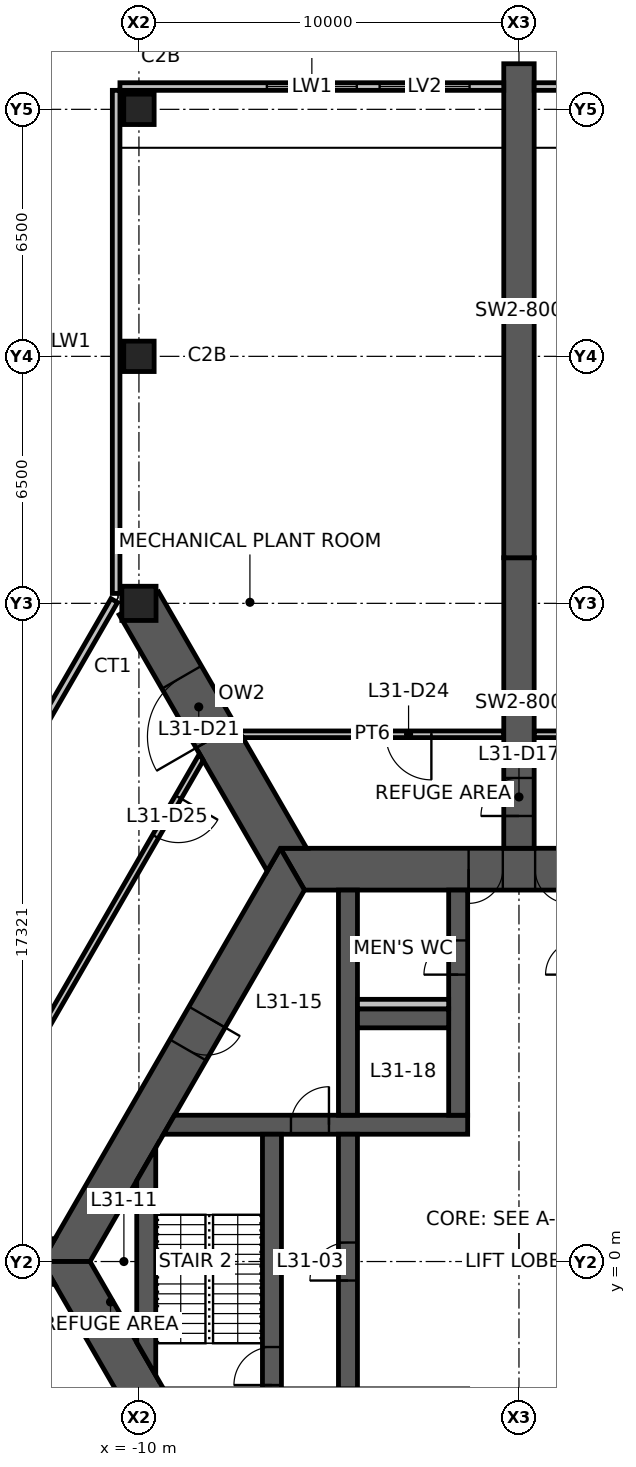
"""IFC4 building model, lengths in metres.
Left out: names, types, materials, properties, quantities, classifications, styles, units other than length and angle.
Written with IfcOpenShell. Run it as: python <this file> out.ifc"""

import sys

from ifc_helpers import new_model, si_unit, direction, frame, frame_2d, origin, origin_2d, place, context, subcontext, project, spatial, polyline, rectangle, hollow_rectangle, outline, extrude, element, fill, save


model = new_model("IFC4")
c1 = context("Model", 3, precision=1e-05, world=origin(), true_north=direction((0.0, 1.0)))
c2 = subcontext(c1, "Body", "Model", "MODEL_VIEW")
j1 = project(units=[si_unit("LENGTHUNIT", "METRE"), si_unit("PLANEANGLEUNIT", "RADIAN")], contexts=[c1])
p1 = place(None, origin())
s1 = spatial("IfcSite", under=j1, at=p1, CompositionType="ELEMENT")
p2 = place(p1, origin())
s2 = spatial("IfcBuilding", under=s1, at=p2, CompositionType="ELEMENT")
p3 = place(p2, frame((0.0, 0.0, 123.6)))
s3 = spatial("IfcBuildingStorey", under=s2, at=p3, CompositionType="ELEMENT", Elevation=123.6)
p4 = place(p3, frame((-10.0, 17.321, 0.0), z_axis=(0.0, 0.0, 1.0), x_axis=(1.0, 0.0, 0.0)))
e1 = element("IfcColumn", 1, at=p4, inside=s3, PredefinedType="COLUMN", context=c2, shape_type="SweptSolid", body=[
    extrude(hollow_rectangle(XDim=0.9, YDim=0.9, WallThickness=0.07, at=origin_2d()), origin(), (0.0, 0.0, 1.0), 5.0),
])
for number, where, z_axis, x_axis in (
    (2, (-10.0, 23.821, 0.0), (0.0, 0.0, 1.0), (1.0, 0.0, 0.0)),
    (3, (-10.0, 30.321, 0.0), (0.0, 0.0, 1.0), (1.0, 0.0, 0.0)),
):
    element("IfcColumn", number, at=place(p3, frame(where, z_axis=z_axis, x_axis=x_axis)), inside=s3, PredefinedType="COLUMN", context=c2, shape_type="SweptSolid", body=[
        extrude(hollow_rectangle(XDim=0.8, YDim=0.8, WallThickness=0.045, at=origin_2d()), origin(), (0.0, 0.0, 1.0), 5.0),
    ])
p5 = place(p3, frame((5.961, 10.325, 0.0), z_axis=(0.0, 0.0, 1.0), x_axis=(-1.0, 0.0, 0.0)))
e4 = element("IfcWall", 4, at=p5, inside=s3, PredefinedType="SHEAR", context=c2, shape_type="SweptSolid", body=[
    extrude(outline(polyline([(-0.318, -0.55), (4.636, -0.55), (5.536, -0.55), (6.386, -0.55), (7.286, -0.55), (12.24, -0.55), (11.605, 0.55), (7.286, 0.55), (6.386, 0.55), (5.536, 0.55), (4.636, 0.55), (0.318, 0.55), (-0.318, -0.55)])), origin(), (0.0, 0.0, 1.0), 5.0),
])
p6 = place(p5, frame((6.386, 0.0, 0.0)))
e5 = element("IfcOpeningElement", 5, at=p6, cuts=e4, PredefinedType="OPENING", context=c2, shape_type="SweptSolid", body=[
    extrude(rectangle(XDim=0.9, YDim=2.1, at=frame_2d((0.45, 1.05))), frame((0.0, 0.56, 0.0), z_axis=(0.0, -1.0, 0.0), x_axis=(1.0, 0.0, 0.0)), (0.0, 0.0, 1.0), 1.12),
])
p7 = place(p5, frame((4.636, 0.0, 0.0)))
e6 = element("IfcOpeningElement", 6, at=p7, cuts=e4, PredefinedType="OPENING", context=c2, shape_type="SweptSolid", body=[
    extrude(rectangle(XDim=0.9, YDim=2.1, at=frame_2d((0.45, 1.05))), frame((0.0, 0.56, 0.0), z_axis=(0.0, -1.0, 0.0), x_axis=(1.0, 0.0, 0.0)), (0.0, 0.0, 1.0), 1.12),
])
p8 = place(p3, frame((-5.961, 10.325, 0.0), z_axis=(0.0, 0.0, 1.0), x_axis=(-0.500004296715, -0.866022923061, 0.0)))
e7 = element("IfcWall", 7, at=p8, inside=s3, PredefinedType="SHEAR", context=c2, shape_type="SweptSolid", body=[
    extrude(outline(polyline([(-0.318, -0.55), (4.494, -0.55), (5.494, -0.55), (12.24, -0.55), (11.605, 0.55), (5.494, 0.55), (4.494, 0.55), (0.318, 0.55), (-0.318, -0.55)])), origin(), (0.0, 0.0, 1.0), 5.0),
])
p9 = place(p8, frame((4.494, 0.0, 0.0)))
e8 = element("IfcOpeningElement", 8, at=p9, cuts=e7, PredefinedType="OPENING", context=c2, shape_type="SweptSolid", body=[
    extrude(rectangle(XDim=1.0, YDim=2.1, at=frame_2d((0.5, 1.05))), frame((0.0, 0.56, 0.0), z_axis=(0.0, -1.0, 0.0), x_axis=(1.0, 0.0, 0.0)), (0.0, 0.0, 1.0), 1.12),
])
p10 = place(p3, frame((-11.922, 0.0, 0.0), z_axis=(0.0, 0.0, 1.0), x_axis=(0.500004296715, -0.866022923061, 0.0)))
e9 = element("IfcWall", 9, at=p10, inside=s3, PredefinedType="SHEAR", context=c2, shape_type="SweptSolid", body=[
    extrude(outline(polyline([(-0.318, -0.55), (6.381, -0.55), (7.181, -0.55), (12.24, -0.55), (11.605, 0.55), (7.181, 0.55), (6.381, 0.55), (0.318, 0.55), (-0.318, -0.55)])), origin(), (0.0, 0.0, 1.0), 5.0),
])
p11 = place(p10, frame((6.381, 0.0, 0.0)))
e10 = element("IfcOpeningElement", 10, at=p11, cuts=e9, PredefinedType="OPENING", context=c2, shape_type="SweptSolid", body=[
    extrude(rectangle(XDim=0.8, YDim=2.1, at=frame_2d((0.4, 1.05))), frame((0.0, 0.56, 0.0), z_axis=(0.0, -1.0, 0.0), x_axis=(1.0, 0.0, 0.0)), (0.0, 0.0, 1.0), 1.12),
])
p12 = place(p3, frame((0.0, 10.875, 0.0), z_axis=(0.0, 0.0, 1.0), x_axis=(0.0, 1.0, 0.0)))
e11 = element("IfcWall", 11, at=p12, inside=s3, PredefinedType="SHEAR", context=c2, shape_type="SweptSolid", body=[
    extrude(rectangle(XDim=7.646, YDim=0.8, at=frame_2d((3.823, 0.0))), origin(), (0.0, 0.0, 1.0), 5.0),
])
p13 = place(p12, frame((0.85, 0.0, 0.0)))
e12 = element("IfcOpeningElement", 12, at=p13, cuts=e11, PredefinedType="OPENING", context=c2, shape_type="SweptSolid", body=[
    extrude(rectangle(XDim=1.0, YDim=2.1, at=frame_2d((0.5, 1.05))), frame((0.0, 0.41, 0.0), z_axis=(0.0, -1.0, 0.0), x_axis=(1.0, 0.0, 0.0)), (0.0, 0.0, 1.0), 0.82),
])
p14 = place(p3, frame((0.0, 18.521, 0.0), z_axis=(0.0, 0.0, 1.0), x_axis=(0.0, 1.0, 0.0)))
e13 = element("IfcWall", 13, at=p14, inside=s3, PredefinedType="SHEAR", context=c2, shape_type="SweptSolid", body=[
    extrude(rectangle(XDim=13.0, YDim=0.8, at=frame_2d((6.5, 0.0))), origin(), (0.0, 0.0, 1.0), 5.0),
])
p15 = place(p3, frame((-6.279, 10.875, -1.15), z_axis=(0.0, 0.0, 1.0), x_axis=(-0.50000923905, 0.866020069551, 0.0)))
e14 = element("IfcWall", 14, at=p15, inside=s3, PredefinedType="SHEAR", context=c2, shape_type="SweptSolid", body=[
    extrude(outline(polyline([(-0.346, -0.6), (3.395, -0.6), (5.195, -0.6), (7.443, -0.6), (7.443, 0.6), (5.195, 0.6), (3.395, 0.6), (-0.346, 0.6), (0.0, 0.0), (-0.346, -0.6)])), origin(), (0.0, 0.0, 1.0), 6.15),
])
p16 = place(p15, frame((3.395, 0.0, 1.15)))
e15 = element("IfcOpeningElement", 15, at=p16, cuts=e14, PredefinedType="OPENING", context=c2, shape_type="SweptSolid", body=[
    extrude(rectangle(XDim=1.8, YDim=2.4, at=frame_2d((0.9, 1.2))), frame((0.0, 0.61, 0.0), z_axis=(0.0, -1.0, 0.0), x_axis=(1.0, 0.0, 0.0)), (0.0, 0.0, 1.0), 1.22),
])
p17 = place(p3, frame((-12.557, 0.0, -1.15), z_axis=(0.0, 0.0, 1.0), x_axis=(-1.0, 0.0, 0.0)))
e16 = element("IfcWall", 16, at=p17, inside=s3, PredefinedType="SHEAR", context=c2, shape_type="SweptSolid", body=[
    extrude(outline(polyline([(-0.346, -0.6), (7.443, -0.6), (7.443, 0.6), (-0.346, 0.6), (0.0, 0.0), (-0.346, -0.6)])), origin(), (0.0, 0.0, 1.0), 6.15),
])
p18 = place(p3, frame((10.5, 30.92, 0.0), z_axis=(0.0, 0.0, 1.0), x_axis=(-1.0, 0.0, 0.0)))
e17 = element("IfcWall", 17, at=p18, inside=s3, PredefinedType="ELEMENTEDWALL", context=c2, shape_type="SweptSolid", body=[
    extrude(rectangle(XDim=10.1, YDim=0.2, at=frame_2d((5.05, 0.0))), origin(), (0.0, 0.0, 1.0), 5.0),
])
p19 = place(p18, frame((3.867, 0.0, 0.6)))
e18 = element("IfcOpeningElement", 18, at=p19, cuts=e17, PredefinedType="OPENING", context=c2, shape_type="SweptSolid", body=[
    extrude(rectangle(XDim=2.367, YDim=3.6, at=frame_2d((1.183, 1.8))), frame((0.0, 0.11, 0.0), z_axis=(0.0, -1.0, 0.0), x_axis=(1.0, 0.0, 0.0)), (0.0, 0.0, 1.0), 0.22),
])
p20 = place(p18, frame((6.833, 0.0, 0.6)))
e19 = element("IfcOpeningElement", 19, at=p20, cuts=e17, PredefinedType="OPENING", context=c2, shape_type="SweptSolid", body=[
    extrude(rectangle(XDim=2.367, YDim=3.6, at=frame_2d((1.183, 1.8))), frame((0.0, 0.11, 0.0), z_axis=(0.0, -1.0, 0.0), x_axis=(1.0, 0.0, 0.0)), (0.0, 0.0, 1.0), 0.22),
])
p21 = place(p3, frame((-0.4, 30.92, 0.0), z_axis=(0.0, 0.0, 1.0), x_axis=(-1.0, 0.0, 0.0)))
e20 = element("IfcWall", 20, at=p21, inside=s3, PredefinedType="ELEMENTEDWALL", context=c2, shape_type="SweptSolid", body=[
    extrude(rectangle(XDim=10.1, YDim=0.2, at=frame_2d((5.05, 0.0))), origin(), (0.0, 0.0, 1.0), 5.0),
])
p22 = place(p21, frame((0.9, 0.0, 0.6)))
e21 = element("IfcOpeningElement", 21, at=p22, cuts=e20, PredefinedType="OPENING", context=c2, shape_type="SweptSolid", body=[
    extrude(rectangle(XDim=2.367, YDim=3.6, at=frame_2d((1.183, 1.8))), frame((0.0, 0.11, 0.0), z_axis=(0.0, -1.0, 0.0), x_axis=(1.0, 0.0, 0.0)), (0.0, 0.0, 1.0), 0.22),
])
p23 = place(p21, frame((3.867, 0.0, 0.6)))
e22 = element("IfcOpeningElement", 22, at=p23, cuts=e20, PredefinedType="OPENING", context=c2, shape_type="SweptSolid", body=[
    extrude(rectangle(XDim=2.367, YDim=3.6, at=frame_2d((1.183, 1.8))), frame((0.0, 0.11, 0.0), z_axis=(0.0, -1.0, 0.0), x_axis=(1.0, 0.0, 0.0)), (0.0, 0.0, 1.0), 0.22),
])
p24 = place(p3, frame((-10.6, 30.821, 0.0), z_axis=(0.0, 0.0, 1.0), x_axis=(0.0, -1.0, 0.0)))
e23 = element("IfcWall", 23, at=p24, inside=s3, PredefinedType="ELEMENTEDWALL", context=c2, shape_type="SweptSolid", body=[
    extrude(rectangle(XDim=13.239, YDim=0.2, at=frame_2d((6.62, 0.0))), origin(), (0.0, 0.0, 1.0), 5.0),
])
p25 = place(p3, frame((-10.65, 17.395, 0.0), z_axis=(0.0, 0.0, 1.0), x_axis=(-0.499999841607, -0.866025495233, 0.0)))
e24 = element("IfcWall", 24, at=p25, inside=s3, PredefinedType="ELEMENTEDWALL", context=c2, shape_type="SweptSolid", body=[
    extrude(rectangle(XDim=19.479, YDim=0.2, at=frame_2d((9.739, 0.0))), origin(), (0.0, 0.0, 1.0), 5.0),
])
p26 = place(p3, frame((-9.209, 3.6, 0.0), z_axis=(0.0, 0.0, 1.0), x_axis=(1.0, 0.0, 0.0)))
e25 = element("IfcWall", 25, at=p26, inside=s3, PredefinedType="SHEAR", context=c2, shape_type="SweptSolid", body=[
    extrude(outline(polyline([(-0.144, -0.25), (3.209, -0.25), (4.209, -0.25), (7.859, -0.25), (7.859, 0.25), (4.209, 0.25), (3.209, 0.25), (0.144, 0.25), (-0.144, -0.25)])), origin(), (0.0, 0.0, 1.0), 5.0),
])
p27 = place(p26, frame((3.209, 0.0, 0.0)))
e26 = element("IfcOpeningElement", 26, at=p27, cuts=e25, PredefinedType="OPENING", context=c2, shape_type="SweptSolid", body=[
    extrude(rectangle(XDim=1.0, YDim=2.1, at=frame_2d((0.5, 1.05))), frame((0.0, 0.26, 0.0), z_axis=(0.0, -1.0, 0.0), x_axis=(1.0, 0.0, 0.0)), (0.0, 0.0, 1.0), 0.52),
])
p28 = place(p3, frame((-1.6, 3.85, 0.0), z_axis=(0.0, 0.0, 1.0), x_axis=(0.0, 1.0, 0.0)))
e27 = element("IfcWall", 27, at=p28, inside=s3, PredefinedType="SHEAR", context=c2, shape_type="SweptSolid", body=[
    extrude(rectangle(XDim=5.925, YDim=0.5, at=frame_2d((2.962, 0.0))), origin(), (0.0, 0.0, 1.0), 5.0),
])
p29 = place(p28, frame((3.7, 0.0, 0.0)))
e28 = element("IfcOpeningElement", 28, at=p29, cuts=e27, PredefinedType="OPENING", context=c2, shape_type="SweptSolid", body=[
    extrude(rectangle(XDim=0.9, YDim=2.1, at=frame_2d((0.45, 1.05))), frame((0.0, 0.26, 0.0), z_axis=(0.0, -1.0, 0.0), x_axis=(1.0, 0.0, 0.0)), (0.0, 0.0, 1.0), 0.52),
])
p30 = place(p3, frame((-4.5, -3.35, 0.0), z_axis=(0.0, 0.0, 1.0), x_axis=(0.0, 1.0, 0.0)))
e29 = element("IfcWall", 29, at=p30, inside=s3, PredefinedType="SHEAR", context=c2, shape_type="SweptSolid", body=[
    extrude(rectangle(XDim=6.7, YDim=0.5, at=frame_2d((3.35, 0.0))), origin(), (0.0, 0.0, 1.0), 5.0),
])
p31 = place(p30, frame((2.85, 0.0, 0.0)))
e30 = element("IfcOpeningElement", 30, at=p31, cuts=e29, PredefinedType="OPENING", context=c2, shape_type="SweptSolid", body=[
    extrude(rectangle(XDim=1.0, YDim=2.1, at=frame_2d((0.5, 1.05))), frame((0.0, 0.26, 0.0), z_axis=(0.0, -1.0, 0.0), x_axis=(1.0, 0.0, 0.0)), (0.0, 0.0, 1.0), 0.52),
])
p32 = place(p3, frame((-6.5, -3.35, 0.0), z_axis=(0.0, 0.0, 1.0), x_axis=(0.0, 1.0, 0.0)))
e31 = element("IfcWall", 31, at=p32, inside=s3, PredefinedType="SHEAR", context=c2, shape_type="SweptSolid", body=[
    extrude(rectangle(XDim=6.7, YDim=0.5, at=frame_2d((3.35, 0.0))), origin(), (0.0, 0.0, 1.0), 5.0),
])
p33 = place(p32, frame((0.1, 0.0, 0.0)))
e32 = element("IfcOpeningElement", 32, at=p33, cuts=e31, PredefinedType="OPENING", context=c2, shape_type="SweptSolid", body=[
    extrude(rectangle(XDim=1.0, YDim=2.1, at=frame_2d((0.5, 1.05))), frame((0.0, 0.26, 0.0), z_axis=(0.0, -1.0, 0.0), x_axis=(1.0, 0.0, 0.0)), (0.0, 0.0, 1.0), 0.52),
])
p34 = place(p3, frame((-4.5, 3.85, 0.0), z_axis=(0.0, 0.0, 1.0), x_axis=(0.0, 1.0, 0.0)))
e33 = element("IfcWall", 33, at=p34, inside=s3, PredefinedType="SHEAR", context=c2, shape_type="SweptSolid", body=[
    extrude(rectangle(XDim=5.925, YDim=0.5, at=frame_2d((2.962, 0.0))), origin(), (0.0, 0.0, 1.0), 5.0),
])
p35 = place(p3, frame((-4.25, 6.4, 0.0), z_axis=(0.0, 0.0, 1.0), x_axis=(1.0, 0.0, 0.0)))
e34 = element("IfcWall", 34, at=p35, inside=s3, PredefinedType="SHEAR", context=c2, shape_type="SweptSolid", body=[
    extrude(rectangle(XDim=2.4, YDim=0.5, at=frame_2d((1.2, 0.0))), origin(), (0.0, 0.0, 1.0), 5.0),
])
p36 = place(p3, frame((-9.808, -2.562, 0.0), z_axis=(0.0, 0.0, 1.0), x_axis=(0.0, 1.0, 0.0)))
e35 = element("IfcWall", 35, at=p36, inside=s3, PredefinedType="SHEAR", context=c2, shape_type="SweptSolid", body=[
    extrude(outline(polyline([(-0.433, -0.25), (5.558, -0.25), (4.691, 0.25), (0.433, 0.25), (-0.433, -0.25)])), origin(), (0.0, 0.0, 1.0), 5.0),
])
p37 = place(p3, frame((-4.25, 6.775, 0.0), z_axis=(0.0, 0.0, 1.0), x_axis=(1.0, 0.0, 0.0)))
e36 = element("IfcWall", 36, at=p37, inside=s3, PredefinedType="PLUMBINGWALL", context=c2, shape_type="SweptSolid", body=[
    extrude(rectangle(XDim=2.4, YDim=0.25, at=frame_2d((1.2, 0.0))), origin(), (0.0, 0.0, 1.0), 5.0),
])
p38 = place(p3, frame((7.318, 13.875, 0.0), z_axis=(0.0, 0.0, 1.0), x_axis=(-1.0, 0.0, 0.0)))
e37 = element("IfcWall", 37, at=p38, inside=s3, PredefinedType="PARTITIONING", context=c2, shape_type="SweptSolid", body=[
    extrude(outline(polyline([(-0.051, -0.087), (6.913, -0.087), (6.913, 0.087), (0.051, 0.087), (-0.051, -0.087)])), origin(), (0.0, 0.0, 1.0), 4.8),
])
p39 = place(p3, frame((-0.405, 13.875, 0.0), z_axis=(0.0, 0.0, 1.0), x_axis=(-1.0, 0.0, 0.0)))
e38 = element("IfcWall", 38, at=p39, inside=s3, PredefinedType="PARTITIONING", context=c2, shape_type="SweptSolid", body=[
    extrude(outline(polyline([(0.0, -0.087), (1.9, -0.087), (3.1, -0.087), (6.963, -0.087), (6.862, 0.087), (3.1, 0.087), (1.9, 0.087), (0.0, 0.087), (0.0, -0.087)])), origin(), (0.0, 0.0, 1.0), 4.8),
])
p40 = place(p39, frame((1.9, 0.0, 0.0)))
e39 = element("IfcOpeningElement", 39, at=p40, cuts=e38, PredefinedType="OPENING", context=c2, shape_type="SweptSolid", body=[
    extrude(rectangle(XDim=1.2, YDim=2.1, at=frame_2d((0.6, 1.05))), frame((0.0, 0.098, 0.0), z_axis=(0.0, -1.0, 0.0), x_axis=(1.0, 0.0, 0.0)), (0.0, 0.0, 1.0), 0.195),
])
p41 = place(p3, frame((-8.357, 13.275, 0.0), z_axis=(0.0, 0.0, 1.0), x_axis=(-0.500003545903, -0.866023356546, 0.0)))
e40 = element("IfcWall", 40, at=p41, inside=s3, PredefinedType="PARTITIONING", context=c2, shape_type="SweptSolid", body=[
    extrude(outline(polyline([(-0.051, -0.087), (1.213, -0.087), (2.413, -0.087), (14.686, -0.087), (14.585, 0.087), (2.413, 0.087), (1.213, 0.087), (0.051, 0.087), (-0.051, -0.087)])), origin(), (0.0, 0.0, 1.0), 4.8),
])
p42 = place(p41, frame((1.213, 0.0, 0.0)))
e41 = element("IfcOpeningElement", 41, at=p42, cuts=e40, PredefinedType="OPENING", context=c2, shape_type="SweptSolid", body=[
    extrude(rectangle(XDim=1.2, YDim=2.1, at=frame_2d((0.6, 1.05))), frame((0.0, 0.098, 0.0), z_axis=(0.0, -1.0, 0.0), x_axis=(1.0, 0.0, 0.0)), (0.0, 0.0, 1.0), 0.195),
])
p43 = place(p3, frame((-15.675, -0.6, 0.0), z_axis=(0.0, 0.0, 1.0), x_axis=(0.500005739714, -0.866022089933, 0.0)))
e42 = element("IfcWall", 42, at=p43, inside=s3, PredefinedType="PARTITIONING", context=c2, shape_type="SweptSolid", body=[
    extrude(outline(polyline([(-0.051, -0.087), (6.913, -0.087), (6.913, 0.087), (0.051, 0.087), (-0.051, -0.087)])), origin(), (0.0, 0.0, 1.0), 4.8),
])
p44 = place(p22, origin())
e43 = element("IfcWindow", 43, at=p44, inside=s3, PartitioningType="SINGLE_PANEL", PredefinedType="USERDEFINED", context=c2, shape_type="SweptSolid", body=[
    extrude(rectangle(XDim=2.367, YDim=3.6, at=frame_2d((1.183, 1.8))), frame((0.0, 0.03, 0.0), z_axis=(0.0, -1.0, 0.0), x_axis=(1.0, 0.0, 0.0)), (0.0, 0.0, 1.0), 0.06),
])
fill(e21, e43)
p45 = place(p23, origin())
e44 = element("IfcWindow", 44, at=p45, inside=s3, PartitioningType="SINGLE_PANEL", PredefinedType="USERDEFINED", context=c2, shape_type="SweptSolid", body=[
    extrude(rectangle(XDim=2.367, YDim=3.6, at=frame_2d((1.183, 1.8))), frame((0.0, 0.03, 0.0), z_axis=(0.0, -1.0, 0.0), x_axis=(1.0, 0.0, 0.0)), (0.0, 0.0, 1.0), 0.06),
])
fill(e22, e44)
p46 = place(p6, origin())
e45 = element("IfcDoor", 45, at=p46, inside=s3, OperationType="SINGLE_SWING_RIGHT", PredefinedType="DOOR", context=c2, shape_type="SweptSolid", body=[
    extrude(rectangle(XDim=0.9, YDim=2.1, at=frame_2d((0.45, 1.05))), frame((0.0, 0.025, 0.0), z_axis=(0.0, -1.0, 0.0), x_axis=(1.0, 0.0, 0.0)), (0.0, 0.0, 1.0), 0.05),
])
fill(e5, e45)
p47 = place(p7, origin())
e46 = element("IfcDoor", 46, at=p47, inside=s3, OperationType="SINGLE_SWING_LEFT", PredefinedType="DOOR", context=c2, shape_type="SweptSolid", body=[
    extrude(rectangle(XDim=0.9, YDim=2.1, at=frame_2d((0.45, 1.05))), frame((0.0, 0.025, 0.0), z_axis=(0.0, -1.0, 0.0), x_axis=(1.0, 0.0, 0.0)), (0.0, 0.0, 1.0), 0.05),
])
fill(e6, e46)
p48 = place(p9, origin())
e47 = element("IfcDoor", 47, at=p48, inside=s3, OperationType="SINGLE_SWING_LEFT", PredefinedType="DOOR", context=c2, shape_type="SweptSolid", body=[
    extrude(rectangle(XDim=1.0, YDim=2.1, at=frame_2d((0.5, 1.05))), frame((0.0, 0.025, 0.0), z_axis=(0.0, -1.0, 0.0), x_axis=(1.0, 0.0, 0.0)), (0.0, 0.0, 1.0), 0.05),
])
fill(e8, e47)
p49 = place(p31, origin())
e48 = element("IfcDoor", 48, at=p49, inside=s3, OperationType="SINGLE_SWING_LEFT", PredefinedType="DOOR", context=c2, shape_type="SweptSolid", body=[
    extrude(rectangle(XDim=1.0, YDim=2.1, at=frame_2d((0.5, 1.05))), frame((0.0, 0.025, 0.0), z_axis=(0.0, -1.0, 0.0), x_axis=(1.0, 0.0, 0.0)), (0.0, 0.0, 1.0), 0.05),
])
fill(e30, e48)
p50 = place(p33, origin())
e49 = element("IfcDoor", 49, at=p50, inside=s3, OperationType="SINGLE_SWING_LEFT", PredefinedType="DOOR", context=c2, shape_type="SweptSolid", body=[
    extrude(rectangle(XDim=1.0, YDim=2.1, at=frame_2d((0.5, 1.05))), frame((0.0, 0.025, 0.0), z_axis=(0.0, -1.0, 0.0), x_axis=(1.0, 0.0, 0.0)), (0.0, 0.0, 1.0), 0.05),
])
fill(e32, e49)
p51 = place(p27, origin())
e50 = element("IfcDoor", 50, at=p51, inside=s3, OperationType="SINGLE_SWING_RIGHT", PredefinedType="DOOR", context=c2, shape_type="SweptSolid", body=[
    extrude(rectangle(XDim=1.0, YDim=2.1, at=frame_2d((0.5, 1.05))), frame((0.0, 0.025, 0.0), z_axis=(0.0, -1.0, 0.0), x_axis=(1.0, 0.0, 0.0)), (0.0, 0.0, 1.0), 0.05),
])
fill(e26, e50)
p52 = place(p29, origin())
e51 = element("IfcDoor", 51, at=p52, inside=s3, OperationType="SINGLE_SWING_LEFT", PredefinedType="DOOR", context=c2, shape_type="SweptSolid", body=[
    extrude(rectangle(XDim=0.9, YDim=2.1, at=frame_2d((0.45, 1.05))), frame((0.0, 0.025, 0.0), z_axis=(0.0, -1.0, 0.0), x_axis=(1.0, 0.0, 0.0)), (0.0, 0.0, 1.0), 0.05),
])
fill(e28, e51)
p53 = place(p13, origin())
e52 = element("IfcDoor", 52, at=p53, inside=s3, OperationType="SINGLE_SWING_LEFT", PredefinedType="DOOR", context=c2, shape_type="SweptSolid", body=[
    extrude(rectangle(XDim=1.0, YDim=2.1, at=frame_2d((0.5, 1.05))), frame((0.0, 0.025, 0.0), z_axis=(0.0, -1.0, 0.0), x_axis=(1.0, 0.0, 0.0)), (0.0, 0.0, 1.0), 0.05),
])
fill(e12, e52)
p54 = place(p16, origin())
e53 = element("IfcDoor", 53, at=p54, inside=s3, OperationType="DOUBLE_DOOR_SINGLE_SWING", PredefinedType="DOOR", context=c2, shape_type="SweptSolid", body=[
    extrude(rectangle(XDim=1.8, YDim=2.4, at=frame_2d((0.9, 1.2))), frame((0.0, 0.025, 0.0), z_axis=(0.0, -1.0, 0.0), x_axis=(1.0, 0.0, 0.0)), (0.0, 0.0, 1.0), 0.05),
])
fill(e15, e53)
p55 = place(p40, origin())
e54 = element("IfcDoor", 54, at=p55, inside=s3, OperationType="DOUBLE_DOOR_SINGLE_SWING", PredefinedType="DOOR", context=c2, shape_type="SweptSolid", body=[
    extrude(rectangle(XDim=1.2, YDim=2.1, at=frame_2d((0.6, 1.05))), frame((0.0, 0.025, 0.0), z_axis=(0.0, -1.0, 0.0), x_axis=(1.0, 0.0, 0.0)), (0.0, 0.0, 1.0), 0.05),
])
fill(e39, e54)
p56 = place(p42, origin())
e55 = element("IfcDoor", 55, at=p56, inside=s3, OperationType="DOUBLE_DOOR_SINGLE_SWING", PredefinedType="DOOR", context=c2, shape_type="SweptSolid", body=[
    extrude(rectangle(XDim=1.2, YDim=2.1, at=frame_2d((0.6, 1.05))), frame((0.0, 0.025, 0.0), z_axis=(0.0, -1.0, 0.0), x_axis=(1.0, 0.0, 0.0)), (0.0, 0.0, 1.0), 0.05),
])
fill(e41, e55)
save(model, sys.argv[1])
